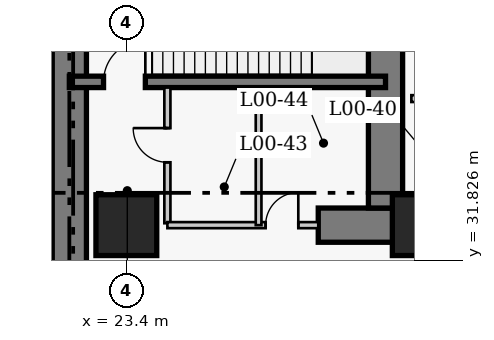
"""IFC4 building model, lengths in metres.
Left out: names, types, materials, properties, quantities, classifications, styles, units other than length and angle.
Written with IfcOpenShell. Run it as: python <this file> out.ifc"""

import sys

from ifc_helpers import new_model, si_unit, direction, frame, frame_2d, origin, origin_2d, place, context, subcontext, project, spatial, rectangle, extrude, element, fill, save


model = new_model("IFC4")
c1 = context("Model", 3, precision=1e-05, world=origin(), true_north=direction((0.0, 1.0)))
c2 = subcontext(c1, "Body", "Model", "MODEL_VIEW")
j1 = project(units=[si_unit("LENGTHUNIT", "METRE"), si_unit("PLANEANGLEUNIT", "RADIAN")], contexts=[c1])
p1 = place(None, origin())
s1 = spatial("IfcSite", under=j1, at=p1, CompositionType="ELEMENT")
p2 = place(p1, origin())
s2 = spatial("IfcBuilding", under=s1, at=p2, CompositionType="ELEMENT")
p3 = place(p2, origin())
s3 = spatial("IfcBuildingStorey", under=s2, at=p3, CompositionType="ELEMENT", Elevation=0.0)
p4 = place(p3, frame((21.9, 27.05, 0.0), z_axis=(0.0, 0.0, 1.0), x_axis=(0.0, 1.0, 0.0)))
e1 = element("IfcWall", 1, at=p4, inside=s3, PredefinedType="SHEAR", context=c2, shape_type="SweptSolid", body=[
    extrude(rectangle(XDim=13.72, YDim=0.9, at=frame_2d((6.86, 0.0))), origin(), (0.0, 0.0, 1.0), 5.4),
])
p5 = place(p3, frame((28.45, 32.75, 0.0), z_axis=(0.0, 0.0, 1.0), x_axis=(1.0, 0.0, 0.0)))
e2 = element("IfcWall", 2, at=p5, inside=s3, PredefinedType="SHEAR", context=c2, shape_type="SweptSolid", body=[
    extrude(rectangle(XDim=2.4, YDim=0.9, at=frame_2d((1.2, 0.0))), origin(), (0.0, 0.0, 1.0), 5.4),
])
p6 = place(p3, frame((30.22, 33.2, 0.0), z_axis=(0.0, 0.0, 1.0), x_axis=(0.0, 1.0, 0.0)))
e3 = element("IfcWall", 3, at=p6, inside=s3, PredefinedType="SHEAR", context=c2, shape_type="SweptSolid", body=[
    extrude(rectangle(XDim=7.12, YDim=0.9, at=frame_2d((3.56, 0.0))), origin(), (0.0, 0.0, 1.0), 5.4),
])
p7 = place(p3, frame((21.9, 36.52, 0.0), z_axis=(0.0, 0.0, 1.0), x_axis=(1.0, 0.0, 0.0)))
e4 = element("IfcWall", 4, at=p7, inside=s3, PredefinedType="SHEAR", context=c2, shape_type="SweptSolid", body=[
    extrude(rectangle(XDim=8.32, YDim=0.3, at=frame_2d((4.16, 0.0))), origin(), (0.0, 0.0, 1.0), 5.4),
])
p8 = place(p7, frame((0.9, 0.0, 0.0)))
e5 = element("IfcOpeningElement", 5, at=p8, cuts=e4, PredefinedType="OPENING", context=c2, shape_type="SweptSolid", body=[
    extrude(rectangle(XDim=1.1, YDim=2.15, at=frame_2d((0.55, 1.075))), frame((0.0, 0.16, 0.0), z_axis=(0.0, -1.0, 0.0), x_axis=(1.0, 0.0, 0.0)), (0.0, 0.0, 1.0), 0.32),
])
for number, where, z_axis, x_axis in (
    (6, (23.4, 32.75, 0.0), (0.0, 0.0, 1.0), (1.0, 0.0, 0.0)),
    (7, (31.2, 32.75, 0.0), (0.0, 0.0, 1.0), (1.0, 0.0, 0.0)),
):
    element("IfcColumn", number, at=place(p3, frame(where, z_axis=z_axis, x_axis=x_axis)), inside=s3, PredefinedType="COLUMN", context=c2, shape_type="SweptSolid", body=[
        extrude(rectangle(XDim=1.6, YDim=1.6, at=origin_2d()), origin(), (0.0, 0.0, 1.0), 5.4),
    ])
p9 = place(p3, frame((30.9, 36.08, 0.0), z_axis=(0.0, 0.0, 1.0), x_axis=(1.0, 0.0, 0.0)))
e8 = element("IfcWall", 8, at=p9, inside=s3, PredefinedType="PARTITIONING", context=c2, shape_type="SweptSolid", body=[
    extrude(rectangle(XDim=1.85, YDim=0.18, at=frame_2d((0.925, 0.0))), origin(), (0.0, 0.0, 1.0), 5.1),
])
p10 = place(p9, frame((0.48, 0.0, 0.0)))
e9 = element("IfcOpeningElement", 9, at=p10, cuts=e8, PredefinedType="OPENING", context=c2, shape_type="SweptSolid", body=[
    extrude(rectangle(XDim=0.9, YDim=2.15, at=frame_2d((0.45, 1.075))), frame((0.0, 0.1, 0.0), z_axis=(0.0, -1.0, 0.0), x_axis=(1.0, 0.0, 0.0)), (0.0, 0.0, 1.0), 0.2),
])
p11 = place(p3, frame((24.48, 32.8, 0.0), z_axis=(0.0, 0.0, 1.0), x_axis=(0.0, 1.0, 0.0)))
e10 = element("IfcWall", 10, at=p11, inside=s3, PredefinedType="PARTITIONING", context=c2, shape_type="SweptSolid", body=[
    extrude(rectangle(XDim=3.57, YDim=0.16, at=frame_2d((1.785, 0.0))), origin(), (0.0, 0.0, 1.0), 5.1),
])
p12 = place(p11, frame((1.604, 0.0, 0.0)))
e11 = element("IfcOpeningElement", 11, at=p12, cuts=e10, PredefinedType="OPENING", context=c2, shape_type="SweptSolid", body=[
    extrude(rectangle(XDim=0.9, YDim=2.1, at=frame_2d((0.45, 1.05))), frame((0.0, 0.09, 0.0), z_axis=(0.0, -1.0, 0.0), x_axis=(1.0, 0.0, 0.0)), (0.0, 0.0, 1.0), 0.18),
])
p13 = place(p3, frame((24.48, 32.75, 0.0), z_axis=(0.0, 0.0, 1.0), x_axis=(1.0, 0.0, 0.0)))
e12 = element("IfcWall", 12, at=p13, inside=s3, PredefinedType="PARTITIONING", context=c2, shape_type="SweptSolid", body=[
    extrude(rectangle(XDim=3.97, YDim=0.16, at=frame_2d((1.985, 0.0))), origin(), (0.0, 0.0, 1.0), 5.1),
])
p14 = place(p13, frame((2.585, 0.0, 0.0)))
e13 = element("IfcOpeningElement", 13, at=p14, cuts=e12, PredefinedType="OPENING", context=c2, shape_type="SweptSolid", body=[
    extrude(rectangle(XDim=0.86, YDim=2.05, at=frame_2d((0.43, 1.025))), frame((0.0, 0.09, 0.0), z_axis=(0.0, -1.0, 0.0), x_axis=(1.0, 0.0, 0.0)), (0.0, 0.0, 1.0), 0.18),
])
p15 = place(p3, frame((26.88, 32.75, 0.0), z_axis=(0.0, 0.0, 1.0), x_axis=(0.0, 1.0, 0.0)))
e14 = element("IfcWall", 14, at=p15, inside=s3, PredefinedType="PARTITIONING", context=c2, shape_type="SweptSolid", body=[
    extrude(rectangle(XDim=3.62, YDim=0.15, at=frame_2d((1.81, 0.0))), origin(), (0.0, 0.0, 1.0), 5.1),
])
p16 = place(p12, origin())
e15 = element("IfcDoor", 15, at=p16, inside=s3, OperationType="SINGLE_SWING_RIGHT", PredefinedType="DOOR", context=c2, shape_type="SweptSolid", body=[
    extrude(rectangle(XDim=0.9, YDim=2.1, at=frame_2d((0.45, 1.05))), frame((0.0, 0.025, 0.0), z_axis=(0.0, -1.0, 0.0), x_axis=(1.0, 0.0, 0.0)), (0.0, 0.0, 1.0), 0.05),
])
fill(e11, e15)
p17 = place(p14, origin())
e16 = element("IfcDoor", 16, at=p17, inside=s3, OperationType="SINGLE_SWING_RIGHT", PredefinedType="DOOR", context=c2, shape_type="SweptSolid", body=[
    extrude(rectangle(XDim=0.86, YDim=2.05, at=frame_2d((0.43, 1.025))), frame((0.0, 0.025, 0.0), z_axis=(0.0, -1.0, 0.0), x_axis=(1.0, 0.0, 0.0)), (0.0, 0.0, 1.0), 0.05),
])
fill(e13, e16)
p18 = place(p8, origin())
e17 = element("IfcDoor", 17, at=p18, inside=s3, OperationType="SINGLE_SWING_RIGHT", PredefinedType="DOOR", context=c2, shape_type="SweptSolid", body=[
    extrude(rectangle(XDim=1.1, YDim=2.15, at=frame_2d((0.55, 1.075))), frame((0.0, 0.025, 0.0), z_axis=(0.0, -1.0, 0.0), x_axis=(1.0, 0.0, 0.0)), (0.0, 0.0, 1.0), 0.05),
])
fill(e5, e17)
save(model, sys.argv[1])
